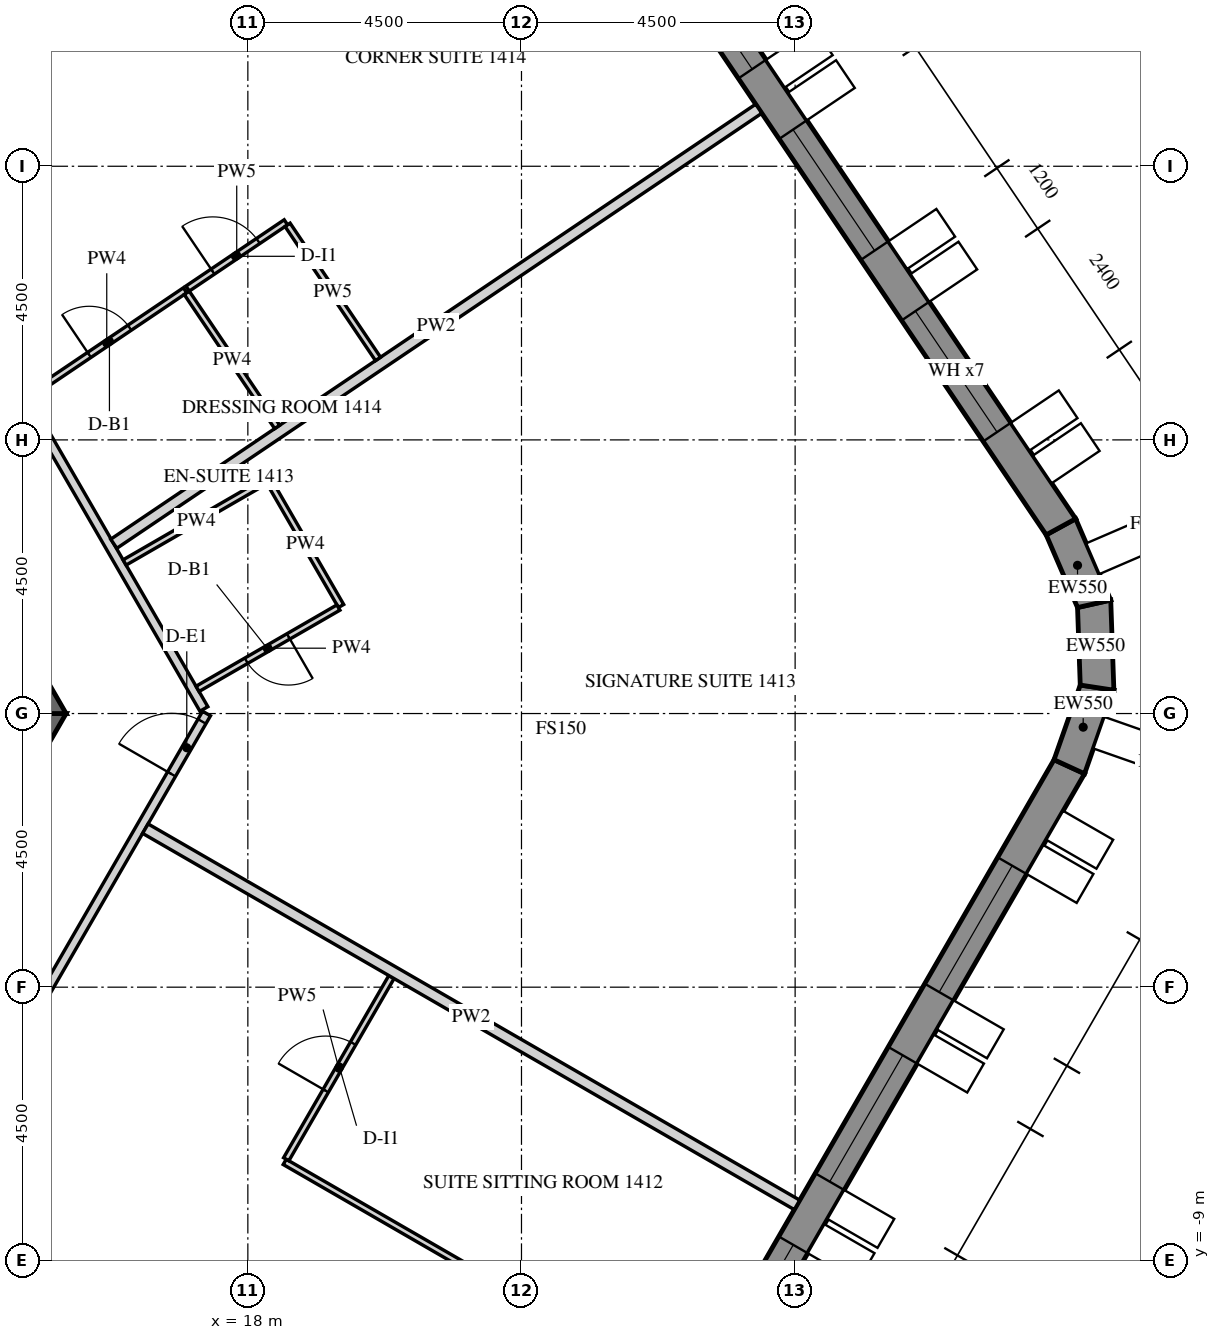
"""IFC4 building model, lengths in metres.
Left out: names, types, materials, properties, quantities, classifications, styles, units other than length and angle.
Written with IfcOpenShell. Run it as: python <this file> out.ifc"""

import sys

from ifc_helpers import new_model, si_unit, direction, frame, frame_2d, origin, place, context, subcontext, project, spatial, polyline, rectangle, outline, extrude, element, fill, save


model = new_model("IFC4")
c1 = context("Model", 3, precision=1e-05, world=origin(), true_north=direction((0.0, 1.0)))
c2 = subcontext(c1, "Body", "Model", "MODEL_VIEW")
j1 = project(units=[si_unit("LENGTHUNIT", "METRE"), si_unit("PLANEANGLEUNIT", "RADIAN")], contexts=[c1])
p1 = place(None, origin())
s1 = spatial("IfcSite", under=j1, at=p1, CompositionType="ELEMENT")
p2 = place(p1, origin())
s2 = spatial("IfcBuilding", under=s1, at=p2, CompositionType="ELEMENT")
p3 = place(p2, frame((0.0, 0.0, 183.9)))
s3 = spatial("IfcBuildingStorey", under=s2, at=p3, CompositionType="ELEMENT", Elevation=183.9)
p4 = place(p3, frame((17.63, -24.914, -0.15), z_axis=(0.0, 0.0, 1.0), x_axis=(0.499998569178, 0.866026229868, 0.0)))
e1 = element("IfcWall", 1, at=p4, inside=s3, PredefinedType="SOLIDWALL", context=c2, shape_type="SweptSolid", body=[
    extrude(outline(polyline([(-0.022, -0.275), (27.783, -0.275), (27.732, 0.275), (0.022, 0.275), (-0.022, -0.275)])), origin(), (0.0, 0.0, 1.0), 3.9),
])
p5 = place(p4, frame((1.879, 0.0, 1.05)))
e2 = element("IfcOpeningElement", 2, at=p5, cuts=e1, PredefinedType="OPENING", context=c2, shape_type="SweptSolid", body=[
    extrude(rectangle(XDim=2.4, YDim=2.4, at=frame_2d((1.2, 1.2))), frame((0.0, 0.285, 0.0), z_axis=(0.0, -1.0, 0.0), x_axis=(1.0, 0.0, 0.0)), (0.0, 0.0, 1.0), 0.57),
])
p6 = place(p4, frame((5.479, 0.0, 1.05)))
e3 = element("IfcOpeningElement", 3, at=p6, cuts=e1, PredefinedType="OPENING", context=c2, shape_type="SweptSolid", body=[
    extrude(rectangle(XDim=2.4, YDim=2.4, at=frame_2d((1.2, 1.2))), frame((0.0, 0.285, 0.0), z_axis=(0.0, -1.0, 0.0), x_axis=(1.0, 0.0, 0.0)), (0.0, 0.0, 1.0), 0.57),
])
p7 = place(p4, frame((9.079, 0.0, 1.05)))
e4 = element("IfcOpeningElement", 4, at=p7, cuts=e1, PredefinedType="OPENING", context=c2, shape_type="SweptSolid", body=[
    extrude(rectangle(XDim=2.4, YDim=2.4, at=frame_2d((1.2, 1.2))), frame((0.0, 0.285, 0.0), z_axis=(0.0, -1.0, 0.0), x_axis=(1.0, 0.0, 0.0)), (0.0, 0.0, 1.0), 0.57),
])
p8 = place(p4, frame((12.679, 0.0, 1.05)))
e5 = element("IfcOpeningElement", 5, at=p8, cuts=e1, PredefinedType="OPENING", context=c2, shape_type="SweptSolid", body=[
    extrude(rectangle(XDim=2.4, YDim=2.4, at=frame_2d((1.2, 1.2))), frame((0.0, 0.285, 0.0), z_axis=(0.0, -1.0, 0.0), x_axis=(1.0, 0.0, 0.0)), (0.0, 0.0, 1.0), 0.57),
])
p9 = place(p4, frame((16.279, 0.0, 1.05)))
e6 = element("IfcOpeningElement", 6, at=p9, cuts=e1, PredefinedType="OPENING", context=c2, shape_type="SweptSolid", body=[
    extrude(rectangle(XDim=2.4, YDim=2.4, at=frame_2d((1.2, 1.2))), frame((0.0, 0.285, 0.0), z_axis=(0.0, -1.0, 0.0), x_axis=(1.0, 0.0, 0.0)), (0.0, 0.0, 1.0), 0.57),
])
p10 = place(p4, frame((19.879, 0.0, 1.05)))
e7 = element("IfcOpeningElement", 7, at=p10, cuts=e1, PredefinedType="OPENING", context=c2, shape_type="SweptSolid", body=[
    extrude(rectangle(XDim=2.4, YDim=2.4, at=frame_2d((1.2, 1.2))), frame((0.0, 0.285, 0.0), z_axis=(0.0, -1.0, 0.0), x_axis=(1.0, 0.0, 0.0)), (0.0, 0.0, 1.0), 0.57),
])
p11 = place(p4, frame((23.479, 0.0, 1.05)))
e8 = element("IfcOpeningElement", 8, at=p11, cuts=e1, PredefinedType="OPENING", context=c2, shape_type="SweptSolid", body=[
    extrude(rectangle(XDim=2.4, YDim=2.4, at=frame_2d((1.2, 1.2))), frame((0.0, 0.285, 0.0), z_axis=(0.0, -1.0, 0.0), x_axis=(1.0, 0.0, 0.0)), (0.0, 0.0, 1.0), 0.57),
])
p12 = place(p3, frame((31.509, -0.875, -0.15), z_axis=(0.0, 0.0, 1.0), x_axis=(0.33111537203, 0.943590276765, 0.0)))
e9 = element("IfcWall", 9, at=p12, inside=s3, PredefinedType="SOLIDWALL", context=c2, shape_type="SweptSolid", body=[
    extrude(outline(polyline([(-0.026, -0.275), (1.431, -0.275), (1.327, 0.275), (0.026, 0.275), (-0.026, -0.275)])), origin(), (0.0, 0.0, 1.0), 3.9),
])
p13 = place(p3, frame((31.966, 0.426, -0.15), z_axis=(0.0, 0.0, 1.0), x_axis=(-0.034876908462, 0.999391615562, 0.0)))
e10 = element("IfcWall", 10, at=p13, inside=s3, PredefinedType="SOLIDWALL", context=c2, shape_type="SweptSolid", body=[
    extrude(outline(polyline([(-0.052, -0.275), (1.431, -0.275), (1.327, 0.275), (0.052, 0.275), (-0.052, -0.275)])), origin(), (0.0, 0.0, 1.0), 3.9),
])
p14 = place(p3, frame((31.917, 1.804, -0.15), z_axis=(0.0, 0.0, 1.0), x_axis=(-0.396225741392, 0.918153125496, 0.0)))
e11 = element("IfcWall", 11, at=p14, inside=s3, PredefinedType="SOLIDWALL", context=c2, shape_type="SweptSolid", body=[
    extrude(outline(polyline([(-0.052, -0.275), (1.405, -0.275), (1.353, 0.275), (0.052, 0.275), (-0.052, -0.275)])), origin(), (0.0, 0.0, 1.0), 3.9),
])
p15 = place(p3, frame((31.371, 3.071, -0.15), z_axis=(0.0, 0.0, 1.0), x_axis=(-0.559189891278, 0.829039604297, 0.0)))
e12 = element("IfcWall", 12, at=p15, inside=s3, PredefinedType="SOLIDWALL", context=c2, shape_type="SweptSolid", body=[
    extrude(outline(polyline([(-0.026, -0.275), (27.781, -0.275), (27.736, 0.275), (0.026, 0.275), (-0.026, -0.275)])), origin(), (0.0, 0.0, 1.0), 3.9),
])
p16 = place(p15, frame((1.879, 0.0, 1.05)))
e13 = element("IfcOpeningElement", 13, at=p16, cuts=e12, PredefinedType="OPENING", context=c2, shape_type="SweptSolid", body=[
    extrude(rectangle(XDim=2.4, YDim=2.4, at=frame_2d((1.2, 1.2))), frame((0.0, 0.285, 0.0), z_axis=(0.0, -1.0, 0.0), x_axis=(1.0, 0.0, 0.0)), (0.0, 0.0, 1.0), 0.57),
])
p17 = place(p15, frame((5.479, 0.0, 1.05)))
e14 = element("IfcOpeningElement", 14, at=p17, cuts=e12, PredefinedType="OPENING", context=c2, shape_type="SweptSolid", body=[
    extrude(rectangle(XDim=2.4, YDim=2.4, at=frame_2d((1.2, 1.2))), frame((0.0, 0.285, 0.0), z_axis=(0.0, -1.0, 0.0), x_axis=(1.0, 0.0, 0.0)), (0.0, 0.0, 1.0), 0.57),
])
p18 = place(p15, frame((9.079, 0.0, 1.05)))
e15 = element("IfcOpeningElement", 15, at=p18, cuts=e12, PredefinedType="OPENING", context=c2, shape_type="SweptSolid", body=[
    extrude(rectangle(XDim=2.4, YDim=2.4, at=frame_2d((1.2, 1.2))), frame((0.0, 0.285, 0.0), z_axis=(0.0, -1.0, 0.0), x_axis=(1.0, 0.0, 0.0)), (0.0, 0.0, 1.0), 0.57),
])
p19 = place(p15, frame((12.679, 0.0, 1.05)))
e16 = element("IfcOpeningElement", 16, at=p19, cuts=e12, PredefinedType="OPENING", context=c2, shape_type="SweptSolid", body=[
    extrude(rectangle(XDim=2.4, YDim=2.4, at=frame_2d((1.2, 1.2))), frame((0.0, 0.285, 0.0), z_axis=(0.0, -1.0, 0.0), x_axis=(1.0, 0.0, 0.0)), (0.0, 0.0, 1.0), 0.57),
])
p20 = place(p15, frame((16.279, 0.0, 1.05)))
e17 = element("IfcOpeningElement", 17, at=p20, cuts=e12, PredefinedType="OPENING", context=c2, shape_type="SweptSolid", body=[
    extrude(rectangle(XDim=2.4, YDim=2.4, at=frame_2d((1.2, 1.2))), frame((0.0, 0.285, 0.0), z_axis=(0.0, -1.0, 0.0), x_axis=(1.0, 0.0, 0.0)), (0.0, 0.0, 1.0), 0.57),
])
p21 = place(p15, frame((19.879, 0.0, 1.05)))
e18 = element("IfcOpeningElement", 18, at=p21, cuts=e12, PredefinedType="OPENING", context=c2, shape_type="SweptSolid", body=[
    extrude(rectangle(XDim=2.4, YDim=2.4, at=frame_2d((1.2, 1.2))), frame((0.0, 0.285, 0.0), z_axis=(0.0, -1.0, 0.0), x_axis=(1.0, 0.0, 0.0)), (0.0, 0.0, 1.0), 0.57),
])
p22 = place(p15, frame((23.479, 0.0, 1.05)))
e19 = element("IfcOpeningElement", 19, at=p22, cuts=e12, PredefinedType="OPENING", context=c2, shape_type="SweptSolid", body=[
    extrude(rectangle(XDim=2.4, YDim=2.4, at=frame_2d((1.2, 1.2))), frame((0.0, 0.285, 0.0), z_axis=(0.0, -1.0, 0.0), x_axis=(1.0, 0.0, 0.0)), (0.0, 0.0, 1.0), 0.57),
])
p23 = place(p3, frame((7.361, -12.75, -0.15), z_axis=(0.0, 0.0, 1.0), x_axis=(0.50000571537, 0.866022103989, 0.0)))
e20 = element("IfcWall", 20, at=p23, inside=s3, PredefinedType="SHEAR", context=c2, shape_type="SweptSolid", body=[
    extrude(outline(polyline([(-0.144, -0.25), (14.867, -0.25), (14.578, 0.25), (0.144, 0.25), (-0.144, -0.25)])), origin(), (0.0, 0.0, 1.0), 3.9),
])
p24 = place(p23, frame((6.49, 0.0, 0.15)))
e21 = element("IfcOpeningElement", 21, at=p24, cuts=e20, PredefinedType="OPENING", context=c2, shape_type="SweptSolid", body=[
    extrude(rectangle(XDim=1.8, YDim=2.4, at=frame_2d((0.9, 1.2))), frame((0.0, 0.26, 0.0), z_axis=(0.0, -1.0, 0.0), x_axis=(1.0, 0.0, 0.0)), (0.0, 0.0, 1.0), 0.52),
])
p25 = place(p3, frame((14.722, 0.0, -0.15), z_axis=(0.0, 0.0, 1.0), x_axis=(-0.50000571537, 0.866022103989, 0.0)))
e22 = element("IfcWall", 22, at=p25, inside=s3, PredefinedType="SHEAR", context=c2, shape_type="SweptSolid", body=[
    extrude(outline(polyline([(-0.144, -0.25), (14.867, -0.25), (14.578, 0.25), (0.144, 0.25), (-0.144, -0.25)])), origin(), (0.0, 0.0, 1.0), 3.9),
])
p26 = place(p25, frame((6.432, 0.0, 0.15)))
e23 = element("IfcOpeningElement", 23, at=p26, cuts=e22, PredefinedType="OPENING", context=c2, shape_type="SweptSolid", body=[
    extrude(rectangle(XDim=1.8, YDim=2.4, at=frame_2d((0.9, 1.2))), frame((0.0, 0.26, 0.0), z_axis=(0.0, -1.0, 0.0), x_axis=(1.0, 0.0, 0.0)), (0.0, 0.0, 1.0), 0.52),
])
p27 = place(p3, frame((9.887, -12.875, 0.0), z_axis=(0.0, 0.0, 1.0), x_axis=(0.499998228944, 0.866026426302, 0.0)))
e24 = element("IfcWall", 24, at=p27, inside=s3, PredefinedType="PARTITIONING", context=c2, shape_type="SweptSolid", body=[
    extrude(rectangle(XDim=14.867, YDim=0.15, at=frame_2d((7.433, 0.0))), origin(), (0.0, 0.0, 1.0), 2.988),
])
p28 = place(p27, frame((8.224, 0.0, 0.0)))
e25 = element("IfcOpeningElement", 25, at=p28, cuts=e24, PredefinedType="OPENING", context=c2, shape_type="SweptSolid", body=[
    extrude(rectangle(XDim=1.0, YDim=2.1, at=frame_2d((0.5, 1.05))), frame((0.0, 0.085, 0.0), z_axis=(0.0, -1.0, 0.0), x_axis=(1.0, 0.0, 0.0)), (0.0, 0.0, 1.0), 0.17),
])
p29 = place(p27, frame((13.717, 0.0, 0.0)))
e26 = element("IfcOpeningElement", 26, at=p29, cuts=e24, PredefinedType="OPENING", context=c2, shape_type="SweptSolid", body=[
    extrude(rectangle(XDim=1.0, YDim=2.1, at=frame_2d((0.5, 1.05))), frame((0.0, 0.085, 0.0), z_axis=(0.0, -1.0, 0.0), x_axis=(1.0, 0.0, 0.0)), (0.0, 0.0, 1.0), 0.17),
])
p30 = place(p3, frame((17.277, 0.075, 0.0), z_axis=(0.0, 0.0, 1.0), x_axis=(-0.499998228944, 0.866026426302, 0.0)))
e27 = element("IfcWall", 27, at=p30, inside=s3, PredefinedType="PARTITIONING", context=c2, shape_type="SweptSolid", body=[
    extrude(rectangle(XDim=14.867, YDim=0.15, at=frame_2d((7.433, 0.0))), origin(), (0.0, 0.0, 1.0), 2.988),
])
p31 = place(p30, frame((9.398, 0.0, 0.0)))
e28 = element("IfcOpeningElement", 28, at=p31, cuts=e27, PredefinedType="OPENING", context=c2, shape_type="SweptSolid", body=[
    extrude(rectangle(XDim=1.0, YDim=2.1, at=frame_2d((0.5, 1.05))), frame((0.0, 0.085, 0.0), z_axis=(0.0, -1.0, 0.0), x_axis=(1.0, 0.0, 0.0)), (0.0, 0.0, 1.0), 0.17),
])
p32 = place(p3, frame((12.314, -8.821, 0.0), z_axis=(0.0, 0.0, 1.0), x_axis=(0.866046596414, -0.499963291492, 0.0)))
e29 = element("IfcWall", 29, at=p32, inside=s3, PredefinedType="PARTITIONING", context=c2, shape_type="SweptSolid", body=[
    extrude(rectangle(XDim=2.925, YDim=0.1, at=frame_2d((1.462, 0.0))), origin(), (0.0, 0.0, 1.0), 2.988),
])
p33 = place(p32, frame((1.025, 0.0, 0.0)))
e30 = element("IfcOpeningElement", 30, at=p33, cuts=e29, PredefinedType="OPENING", context=c2, shape_type="SweptSolid", body=[
    extrude(rectangle(XDim=0.8, YDim=2.1, at=frame_2d((0.4, 1.05))), frame((0.0, 0.06, 0.0), z_axis=(0.0, -1.0, 0.0), x_axis=(1.0, 0.0, 0.0)), (0.0, 0.0, 1.0), 0.12),
])
p34 = place(p3, frame((25.231, -11.198, 0.0), z_axis=(0.0, 0.0, 1.0), x_axis=(-0.866033062874, 0.499986733834, 0.0)))
e31 = element("IfcWall", 31, at=p34, inside=s3, PredefinedType="PARTITIONING", context=c2, shape_type="SweptSolid", body=[
    extrude(rectangle(XDim=7.65, YDim=0.1, at=frame_2d((3.825, 0.0))), origin(), (0.0, 0.0, 1.0), 2.988),
])
p35 = place(p3, frame((18.631, -7.33, 0.0), z_axis=(0.0, 0.0, 1.0), x_axis=(0.499978980201, 0.866037539231, 0.0)))
e32 = element("IfcWall", 32, at=p35, inside=s3, PredefinedType="PARTITIONING", context=c2, shape_type="SweptSolid", body=[
    extrude(rectangle(XDim=3.46, YDim=0.1, at=frame_2d((1.73, 0.0))), origin(), (0.0, 0.0, 1.0), 2.988),
])
p36 = place(p35, frame((1.3, 0.0, 0.0)))
e33 = element("IfcOpeningElement", 33, at=p36, cuts=e32, PredefinedType="OPENING", context=c2, shape_type="SweptSolid", body=[
    extrude(rectangle(XDim=0.9, YDim=2.1, at=frame_2d((0.45, 1.05))), frame((0.0, 0.06, 0.0), z_axis=(0.0, -1.0, 0.0), x_axis=(1.0, 0.0, 0.0)), (0.0, 0.0, 1.0), 0.12),
])
p37 = place(p3, frame((27.031, -8.08, 0.0), z_axis=(0.0, 0.0, 1.0), x_axis=(-0.866024931941, 0.500000817256, 0.0)))
e34 = element("IfcWall", 34, at=p37, inside=s3, PredefinedType="PARTITIONING", context=c2, shape_type="SweptSolid", body=[
    extrude(rectangle(XDim=12.375, YDim=0.18, at=frame_2d((6.188, 0.0))), origin(), (0.0, 0.0, 1.0), 2.988),
])
p38 = place(p3, frame((15.973, 2.484, 0.0), z_axis=(0.0, 0.0, 1.0), x_axis=(0.866051307416, 0.49995513091, 0.0)))
e35 = element("IfcWall", 35, at=p38, inside=s3, PredefinedType="PARTITIONING", context=c2, shape_type="SweptSolid", body=[
    extrude(rectangle(XDim=2.725, YDim=0.1, at=frame_2d((1.362, 0.0))), origin(), (0.0, 0.0, 1.0), 2.988),
])
p39 = place(p3, frame((18.358, 3.803, 0.0), z_axis=(0.0, 0.0, 1.0), x_axis=(0.500016218704, -0.866016039709, 0.0)))
e36 = element("IfcWall", 36, at=p39, inside=s3, PredefinedType="PARTITIONING", context=c2, shape_type="SweptSolid", body=[
    extrude(rectangle(XDim=2.35, YDim=0.1, at=frame_2d((1.175, 0.0))), origin(), (0.0, 0.0, 1.0), 2.988),
])
p40 = place(p3, frame((19.49, 1.743, 0.0), z_axis=(0.0, 0.0, 1.0), x_axis=(-0.866004723184, -0.50003581814, 0.0)))
e37 = element("IfcWall", 37, at=p40, inside=s3, PredefinedType="PARTITIONING", context=c2, shape_type="SweptSolid", body=[
    extrude(rectangle(XDim=2.675, YDim=0.1, at=frame_2d((1.337, 0.0))), origin(), (0.0, 0.0, 1.0), 2.988),
])
p41 = place(p40, frame((0.95, 0.0, 0.0)))
e38 = element("IfcOpeningElement", 38, at=p41, cuts=e37, PredefinedType="OPENING", context=c2, shape_type="SweptSolid", body=[
    extrude(rectangle(XDim=0.8, YDim=2.1, at=frame_2d((0.4, 1.05))), frame((0.0, 0.06, 0.0), z_axis=(0.0, -1.0, 0.0), x_axis=(1.0, 0.0, 0.0)), (0.0, 0.0, 1.0), 0.12),
])
p42 = place(p3, frame((26.402, 9.946, 0.0), z_axis=(0.0, 0.0, 1.0), x_axis=(-0.829037771727, -0.559192608187, 0.0)))
e39 = element("IfcWall", 39, at=p42, inside=s3, PredefinedType="PARTITIONING", context=c2, shape_type="SweptSolid", body=[
    extrude(rectangle(XDim=12.794, YDim=0.18, at=frame_2d((6.397, 0.0))), origin(), (0.0, 0.0, 1.0), 2.988),
])
p43 = place(p3, frame((14.392, 5.223, 0.0), z_axis=(0.0, 0.0, 1.0), x_axis=(0.829015360708, 0.559225832477, 0.0)))
e40 = element("IfcWall", 40, at=p43, inside=s3, PredefinedType="PARTITIONING", context=c2, shape_type="SweptSolid", body=[
    extrude(rectangle(XDim=3.107, YDim=0.1, at=frame_2d((1.553, 0.0))), origin(), (0.0, 0.0, 1.0), 2.988),
])
p44 = place(p43, frame((1.207, 0.0, 0.0)))
e41 = element("IfcOpeningElement", 41, at=p44, cuts=e40, PredefinedType="OPENING", context=c2, shape_type="SweptSolid", body=[
    extrude(rectangle(XDim=0.8, YDim=2.1, at=frame_2d((0.4, 1.05))), frame((0.0, 0.06, 0.0), z_axis=(0.0, -1.0, 0.0), x_axis=(1.0, 0.0, 0.0)), (0.0, 0.0, 1.0), 0.12),
])
p45 = place(p3, frame((17.009, 6.988, 0.0), z_axis=(0.0, 0.0, 1.0), x_axis=(0.828974932022, 0.559285760662, 0.0)))
e42 = element("IfcWall", 42, at=p45, inside=s3, PredefinedType="PARTITIONING", context=c2, shape_type="SweptSolid", body=[
    extrude(rectangle(XDim=1.95, YDim=0.1, at=frame_2d((0.975, 0.0))), origin(), (0.0, 0.0, 1.0), 2.988),
])
p46 = place(p45, frame((0.5, 0.0, 0.0)))
e43 = element("IfcOpeningElement", 43, at=p46, cuts=e42, PredefinedType="OPENING", context=c2, shape_type="SweptSolid", body=[
    extrude(rectangle(XDim=0.9, YDim=2.1, at=frame_2d((0.45, 1.05))), frame((0.0, 0.06, 0.0), z_axis=(0.0, -1.0, 0.0), x_axis=(1.0, 0.0, 0.0)), (0.0, 0.0, 1.0), 0.12),
])
p47 = place(p3, frame((18.653, 8.037, 0.0), z_axis=(0.0, 0.0, 1.0), x_axis=(0.559203284223, -0.829030570555, 0.0)))
e44 = element("IfcWall", 44, at=p47, inside=s3, PredefinedType="PARTITIONING", context=c2, shape_type="SweptSolid", body=[
    extrude(rectangle(XDim=2.66, YDim=0.1, at=frame_2d((1.33, 0.0))), origin(), (0.0, 0.0, 1.0), 2.988),
])
p48 = place(p3, frame((18.483, 4.713, 0.0), z_axis=(0.0, 0.0, 1.0), x_axis=(-0.559140201119, 0.829073118303, 0.0)))
e45 = element("IfcWall", 45, at=p48, inside=s3, PredefinedType="PARTITIONING", context=c2, shape_type="SweptSolid", body=[
    extrude(rectangle(XDim=2.66, YDim=0.1, at=frame_2d((1.33, 0.0))), origin(), (0.0, 0.0, 1.0), 2.988),
])
p49 = place(p9, frame((0.0, 0.205, 0.0)))
e46 = element("IfcWindow", 46, at=p49, inside=s3, PartitioningType="DOUBLE_PANEL_VERTICAL", PredefinedType="WINDOW", context=c2, shape_type="SweptSolid", body=[
    extrude(rectangle(XDim=2.4, YDim=2.4, at=frame_2d((1.2, 1.2))), frame((0.0, 0.03, 0.0), z_axis=(0.0, -1.0, 0.0), x_axis=(1.0, 0.0, 0.0)), (0.0, 0.0, 1.0), 0.06),
])
fill(e6, e46)
p50 = place(p10, frame((0.0, 0.205, 0.0)))
e47 = element("IfcWindow", 47, at=p50, inside=s3, PartitioningType="DOUBLE_PANEL_VERTICAL", PredefinedType="WINDOW", context=c2, shape_type="SweptSolid", body=[
    extrude(rectangle(XDim=2.4, YDim=2.4, at=frame_2d((1.2, 1.2))), frame((0.0, 0.03, 0.0), z_axis=(0.0, -1.0, 0.0), x_axis=(1.0, 0.0, 0.0)), (0.0, 0.0, 1.0), 0.06),
])
fill(e7, e47)
p51 = place(p11, frame((0.0, 0.205, 0.0)))
e48 = element("IfcWindow", 48, at=p51, inside=s3, PartitioningType="DOUBLE_PANEL_VERTICAL", PredefinedType="WINDOW", context=c2, shape_type="SweptSolid", body=[
    extrude(rectangle(XDim=2.4, YDim=2.4, at=frame_2d((1.2, 1.2))), frame((0.0, 0.03, 0.0), z_axis=(0.0, -1.0, 0.0), x_axis=(1.0, 0.0, 0.0)), (0.0, 0.0, 1.0), 0.06),
])
fill(e8, e48)
p52 = place(p16, frame((0.0, 0.205, 0.0)))
e49 = element("IfcWindow", 49, at=p52, inside=s3, PartitioningType="DOUBLE_PANEL_VERTICAL", PredefinedType="WINDOW", context=c2, shape_type="SweptSolid", body=[
    extrude(rectangle(XDim=2.4, YDim=2.4, at=frame_2d((1.2, 1.2))), frame((0.0, 0.03, 0.0), z_axis=(0.0, -1.0, 0.0), x_axis=(1.0, 0.0, 0.0)), (0.0, 0.0, 1.0), 0.06),
])
fill(e13, e49)
p53 = place(p17, frame((0.0, 0.205, 0.0)))
e50 = element("IfcWindow", 50, at=p53, inside=s3, PartitioningType="DOUBLE_PANEL_VERTICAL", PredefinedType="WINDOW", context=c2, shape_type="SweptSolid", body=[
    extrude(rectangle(XDim=2.4, YDim=2.4, at=frame_2d((1.2, 1.2))), frame((0.0, 0.03, 0.0), z_axis=(0.0, -1.0, 0.0), x_axis=(1.0, 0.0, 0.0)), (0.0, 0.0, 1.0), 0.06),
])
fill(e14, e50)
p54 = place(p18, frame((0.0, 0.205, 0.0)))
e51 = element("IfcWindow", 51, at=p54, inside=s3, PartitioningType="DOUBLE_PANEL_VERTICAL", PredefinedType="WINDOW", context=c2, shape_type="SweptSolid", body=[
    extrude(rectangle(XDim=2.4, YDim=2.4, at=frame_2d((1.2, 1.2))), frame((0.0, 0.03, 0.0), z_axis=(0.0, -1.0, 0.0), x_axis=(1.0, 0.0, 0.0)), (0.0, 0.0, 1.0), 0.06),
])
fill(e15, e51)
p55 = place(p36, origin())
e52 = element("IfcDoor", 52, at=p55, inside=s3, OperationType="SINGLE_SWING_RIGHT", PredefinedType="DOOR", context=c2, shape_type="SweptSolid", body=[
    extrude(rectangle(XDim=0.9, YDim=2.1, at=frame_2d((0.45, 1.05))), frame((0.0, 0.025, 0.0), z_axis=(0.0, -1.0, 0.0), x_axis=(1.0, 0.0, 0.0)), (0.0, 0.0, 1.0), 0.05),
])
fill(e33, e52)
p56 = place(p29, origin())
e53 = element("IfcDoor", 53, at=p56, inside=s3, OperationType="SINGLE_SWING_LEFT", PredefinedType="DOOR", context=c2, shape_type="SweptSolid", body=[
    extrude(rectangle(XDim=1.0, YDim=2.1, at=frame_2d((0.5, 1.05))), frame((0.0, 0.025, 0.0), z_axis=(0.0, -1.0, 0.0), x_axis=(1.0, 0.0, 0.0)), (0.0, 0.0, 1.0), 0.05),
])
fill(e26, e53)
p57 = place(p41, origin())
e54 = element("IfcDoor", 54, at=p57, inside=s3, OperationType="SINGLE_SWING_RIGHT", PredefinedType="DOOR", context=c2, shape_type="SweptSolid", body=[
    extrude(rectangle(XDim=0.8, YDim=2.1, at=frame_2d((0.4, 1.05))), frame((0.0, 0.025, 0.0), z_axis=(0.0, -1.0, 0.0), x_axis=(1.0, 0.0, 0.0)), (0.0, 0.0, 1.0), 0.05),
])
fill(e38, e54)
p58 = place(p44, origin())
e55 = element("IfcDoor", 55, at=p58, inside=s3, OperationType="SINGLE_SWING_LEFT", PredefinedType="DOOR", context=c2, shape_type="SweptSolid", body=[
    extrude(rectangle(XDim=0.8, YDim=2.1, at=frame_2d((0.4, 1.05))), frame((0.0, 0.025, 0.0), z_axis=(0.0, -1.0, 0.0), x_axis=(1.0, 0.0, 0.0)), (0.0, 0.0, 1.0), 0.05),
])
fill(e41, e55)
p59 = place(p46, origin())
e56 = element("IfcDoor", 56, at=p59, inside=s3, OperationType="SINGLE_SWING_RIGHT", PredefinedType="DOOR", context=c2, shape_type="SweptSolid", body=[
    extrude(rectangle(XDim=0.9, YDim=2.1, at=frame_2d((0.45, 1.05))), frame((0.0, 0.025, 0.0), z_axis=(0.0, -1.0, 0.0), x_axis=(1.0, 0.0, 0.0)), (0.0, 0.0, 1.0), 0.05),
])
fill(e43, e56)
save(model, sys.argv[1])
